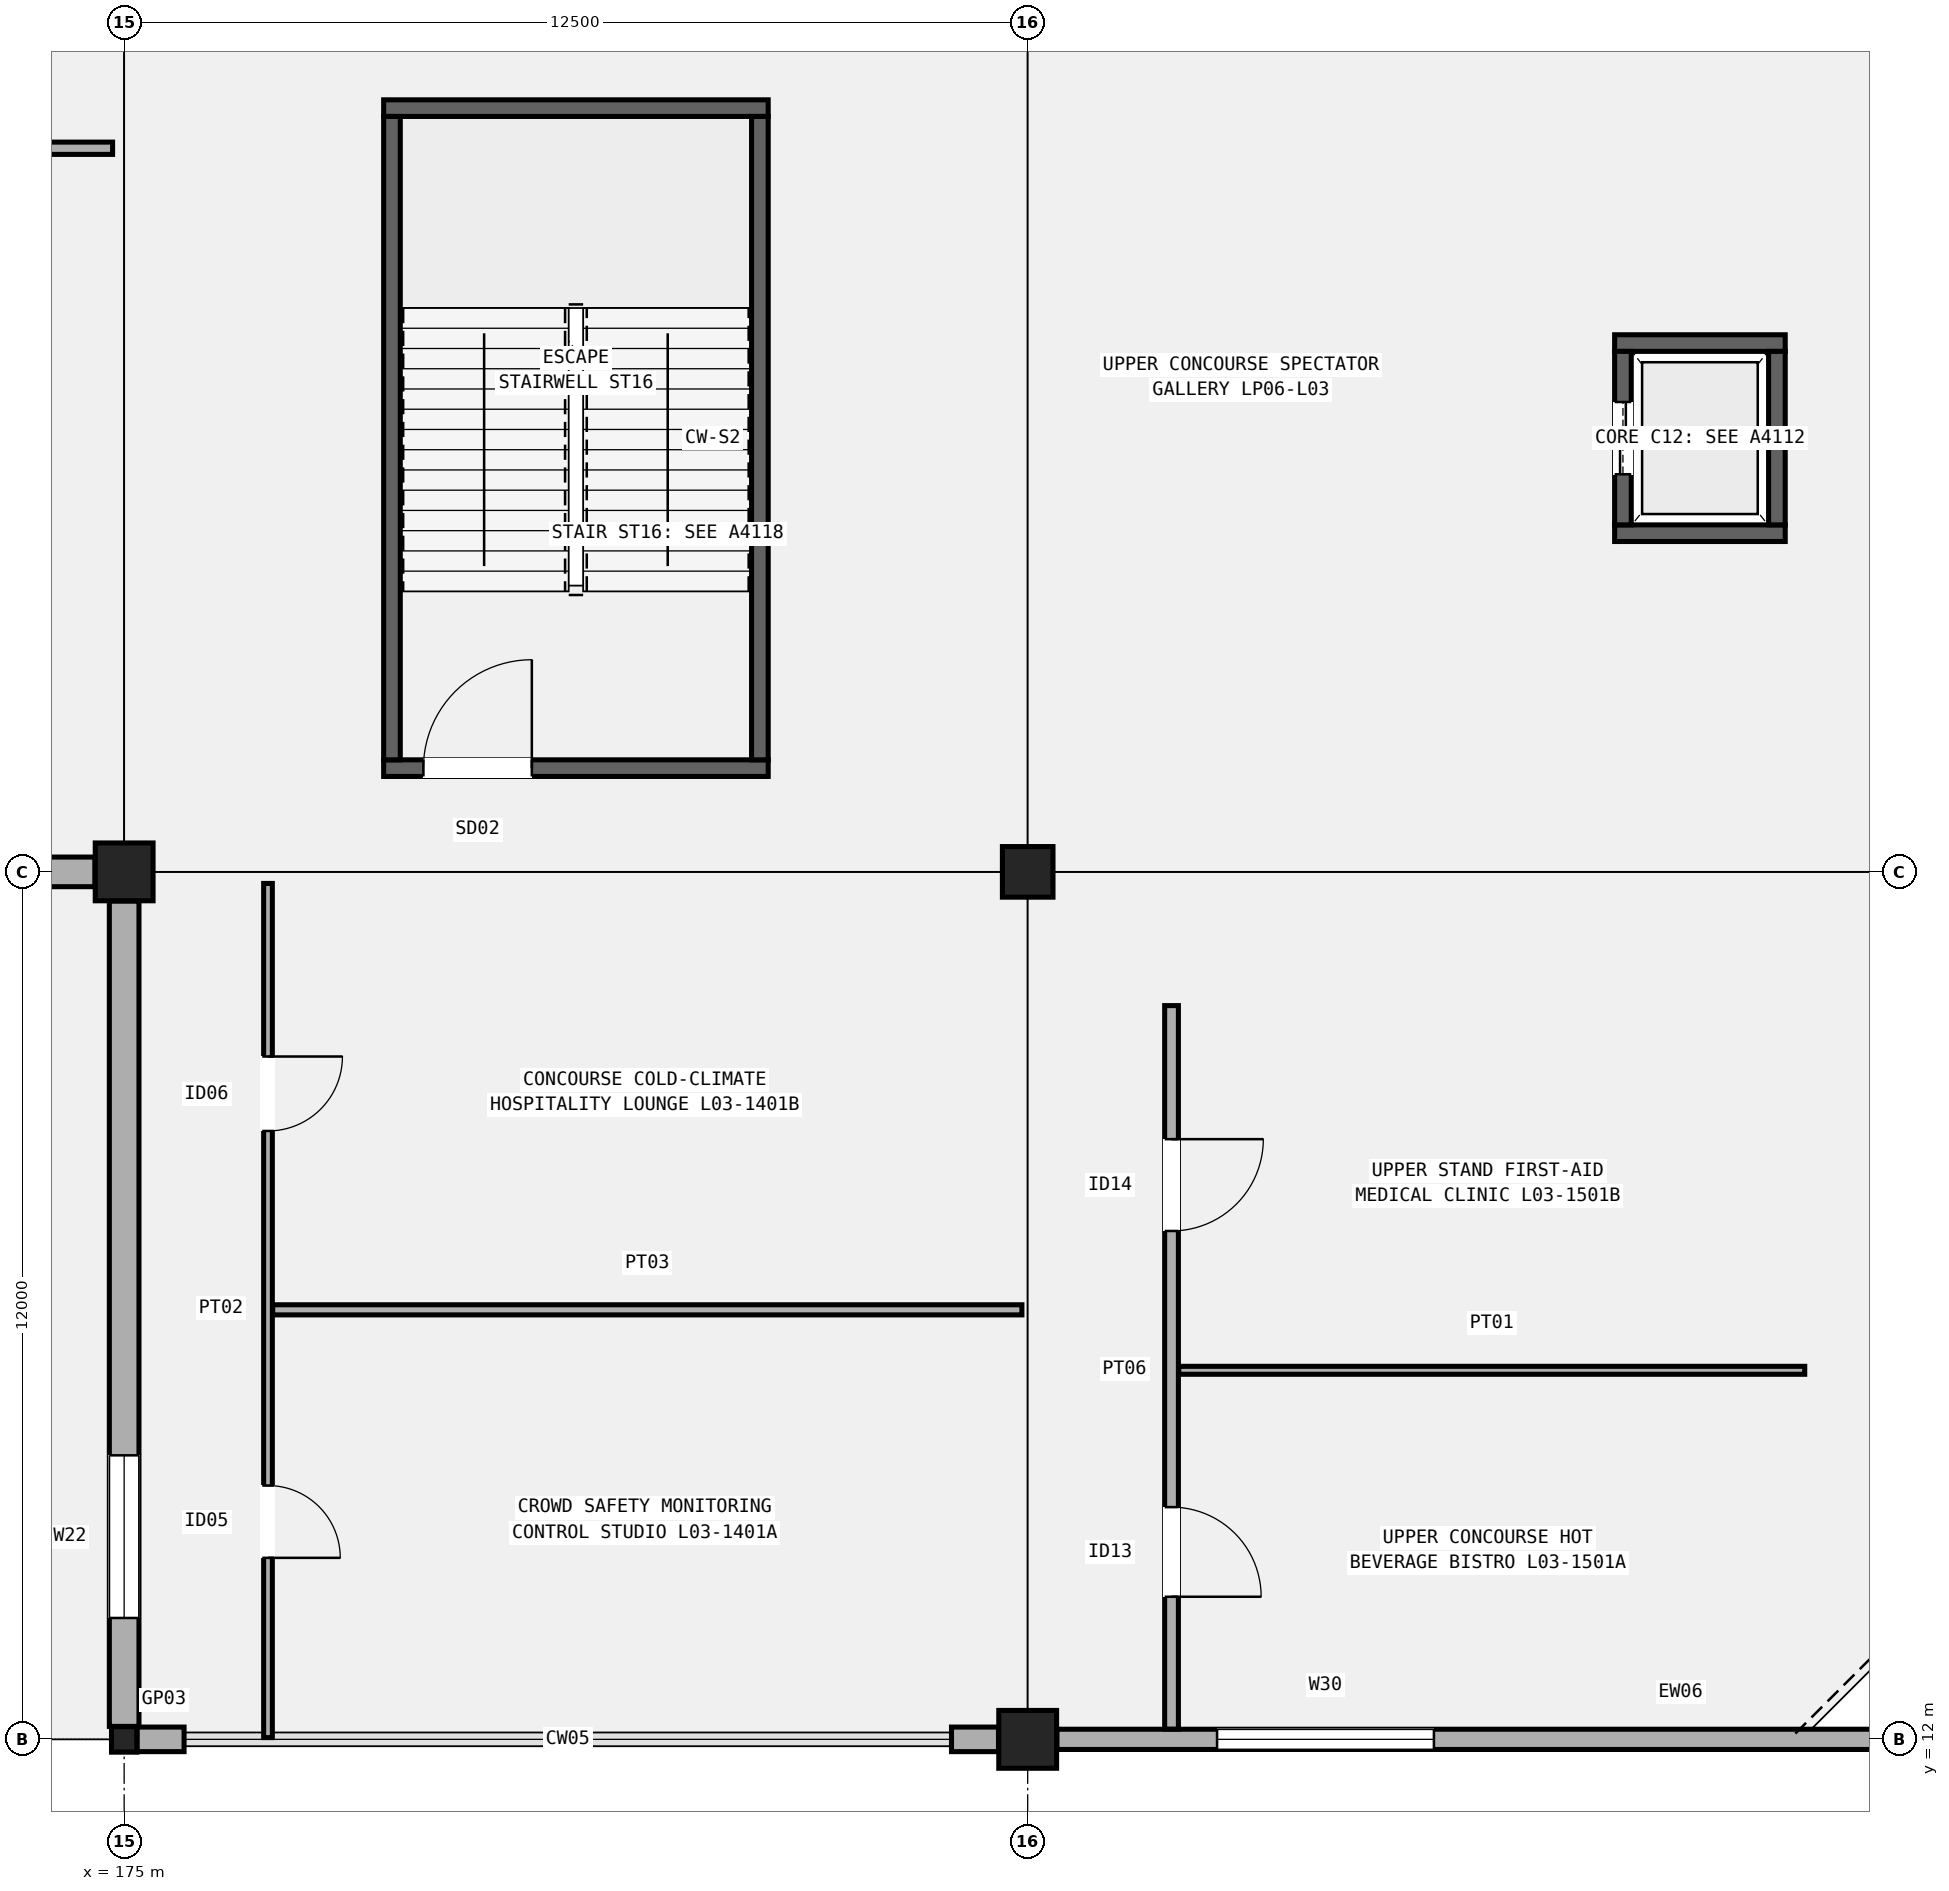
"""IFC4 building model, lengths in metres.
Left out: names, types, materials, properties, quantities, classifications, styles, units other than length and angle.
Written with IfcOpenShell. Run it as: python <this file> out.ifc"""

import sys

from ifc_helpers import new_model, si_unit, direction, frame, frame_2d, origin, origin_2d, place, context, subcontext, project, spatial, rectangle, hollow_rectangle, extrude, element, fill, save


model = new_model("IFC4")
c1 = context("Model", 3, precision=1e-05, world=origin(), true_north=direction((0.0, 1.0)))
c2 = subcontext(c1, "Body", "Model", "MODEL_VIEW")
j1 = project(units=[si_unit("LENGTHUNIT", "METRE"), si_unit("PLANEANGLEUNIT", "RADIAN")], contexts=[c1])
p1 = place(None, origin())
s1 = spatial("IfcSite", under=j1, at=p1, CompositionType="ELEMENT")
p2 = place(p1, origin())
s2 = spatial("IfcBuilding", under=s1, at=p2, CompositionType="ELEMENT")
p3 = place(p2, frame((0.0, 0.0, 15.3)))
s3 = spatial("IfcBuildingStorey", under=s2, at=p3, CompositionType="ELEMENT", Elevation=15.3)
p4 = place(p3, frame((175.0, 12.0, 0.0), z_axis=(0.0, 0.0, 1.0), x_axis=(1.0, 0.0, 0.0)))
e1 = element("IfcColumn", 1, at=p4, inside=s3, PredefinedType="COLUMN", context=c2, shape_type="SweptSolid", body=[
    extrude(hollow_rectangle(XDim=0.35, YDim=0.35, WallThickness=0.016, InnerFilletRadius=0.016, OuterFilletRadius=0.032, at=origin_2d()), origin(), (0.0, 0.0, 1.0), 5.1),
])
for number, where, z_axis, x_axis in (
    (2, (175.0, 24.0, 0.0), (0.0, 0.0, 1.0), (1.0, 0.0, 0.0)),
    (3, (187.5, 12.0, 0.0), (0.0, 0.0, 1.0), (1.0, 0.0, 0.0)),
):
    element("IfcColumn", number, at=place(p3, frame(where, z_axis=z_axis, x_axis=x_axis)), inside=s3, PredefinedType="COLUMN", context=c2, shape_type="SweptSolid", body=[
        extrude(rectangle(XDim=0.8, YDim=0.8, at=origin_2d()), origin(), (0.0, 0.0, 1.0), 5.1),
    ])
p5 = place(p3, frame((187.5, 24.0, 0.0), z_axis=(0.0, 0.0, 1.0), x_axis=(1.0, 0.0, 0.0)))
e4 = element("IfcColumn", 4, at=p5, inside=s3, PredefinedType="COLUMN", context=c2, shape_type="SweptSolid", body=[
    extrude(rectangle(XDim=0.7, YDim=0.7, at=origin_2d()), origin(), (0.0, 0.0, 1.0), 5.1),
])
p6 = place(p3, frame((162.679, 24.0, 0.0), z_axis=(0.0, 0.0, 1.0), x_axis=(1.0, 0.0, 0.0)))
e5 = element("IfcWall", 5, at=p6, inside=s3, PredefinedType="SOLIDWALL", context=c2, shape_type="SweptSolid", body=[
    extrude(rectangle(XDim=11.917, YDim=0.41, at=frame_2d((5.958, 0.0))), origin(), (0.0, 0.0, 1.0), 4.06),
])
p7 = place(p6, frame((1.5, 0.0, 0.95)))
e6 = element("IfcOpeningElement", 6, at=p7, cuts=e5, PredefinedType="OPENING", context=c2, shape_type="SweptSolid", body=[
    extrude(rectangle(XDim=2.1, YDim=2.25, at=frame_2d((1.05, 1.125))), frame((0.0, 0.215, 0.0), z_axis=(0.0, -1.0, 0.0), x_axis=(1.0, 0.0, 0.0)), (0.0, 0.0, 1.0), 0.43),
])
p8 = place(p3, frame((175.179, 12.0, 0.0), z_axis=(0.0, 0.0, 1.0), x_axis=(1.0, 0.0, 0.0)))
e7 = element("IfcWall", 7, at=p8, inside=s3, PredefinedType="SOLIDWALL", context=c2, shape_type="SweptSolid", body=[
    extrude(rectangle(XDim=0.65, YDim=0.34, at=frame_2d((0.325, 0.0))), origin(), (0.0, 0.0, 1.0), 4.06),
])
p9 = place(p3, frame((186.446, 12.0, 0.0), z_axis=(0.0, 0.0, 1.0), x_axis=(1.0, 0.0, 0.0)))
e8 = element("IfcWall", 8, at=p9, inside=s3, PredefinedType="SOLIDWALL", context=c2, shape_type="SweptSolid", body=[
    extrude(rectangle(XDim=0.65, YDim=0.34, at=frame_2d((0.325, 0.0))), origin(), (0.0, 0.0, 1.0), 4.06),
])
p10 = place(p3, frame((175.0, 12.179, 0.0), z_axis=(0.0, 0.0, 1.0), x_axis=(0.0, 1.0, 0.0)))
e9 = element("IfcWall", 9, at=p10, inside=s3, PredefinedType="SOLIDWALL", context=c2, shape_type="SweptSolid", body=[
    extrude(rectangle(XDim=11.417, YDim=0.41, at=frame_2d((5.708, 0.0))), origin(), (0.0, 0.0, 1.0), 4.06),
])
p11 = place(p10, frame((1.5, 0.0, 0.95)))
e10 = element("IfcOpeningElement", 10, at=p11, cuts=e9, PredefinedType="OPENING", context=c2, shape_type="SweptSolid", body=[
    extrude(rectangle(XDim=2.25, YDim=2.2, at=frame_2d((1.125, 1.1))), frame((0.0, 0.215, 0.0), z_axis=(0.0, -1.0, 0.0), x_axis=(1.0, 0.0, 0.0)), (0.0, 0.0, 1.0), 0.43),
])
p12 = place(p3, frame((187.904, 12.0, 0.0), z_axis=(0.0, 0.0, 1.0), x_axis=(1.0, 0.0, 0.0)))
e11 = element("IfcWall", 11, at=p12, inside=s3, PredefinedType="SOLIDWALL", context=c2, shape_type="SweptSolid", body=[
    extrude(rectangle(XDim=11.742, YDim=0.28, at=frame_2d((5.871, 0.0))), origin(), (0.0, 0.0, 1.0), 4.16),
])
p13 = place(p12, frame((2.216, 0.0, 0.95)))
e12 = element("IfcOpeningElement", 12, at=p13, cuts=e11, PredefinedType="OPENING", context=c2, shape_type="SweptSolid", body=[
    extrude(rectangle(XDim=3.0, YDim=1.7, at=frame_2d((1.5, 0.85))), frame((0.0, 0.15, 0.0), z_axis=(0.0, -1.0, 0.0), x_axis=(1.0, 0.0, 0.0)), (0.0, 0.0, 1.0), 0.3),
])
p14 = place(p3, frame((178.59, 25.435, 0.0), z_axis=(0.0, 0.0, 1.0), x_axis=(1.0, 0.0, 0.0)))
e13 = element("IfcWall", 13, at=p14, inside=s3, PredefinedType="SHEAR", context=c2, shape_type="SweptSolid", body=[
    extrude(rectangle(XDim=5.32, YDim=0.23, at=frame_2d((2.66, 0.0))), origin(), (0.0, 0.0, 1.0), 4.86),
])
p15 = place(p14, frame((0.55, 0.0, 0.0)))
e14 = element("IfcOpeningElement", 14, at=p15, cuts=e13, PredefinedType="OPENING", context=c2, shape_type="SweptSolid", body=[
    extrude(rectangle(XDim=1.5, YDim=2.2, at=frame_2d((0.75, 1.1))), frame((0.0, 0.125, 0.0), z_axis=(0.0, -1.0, 0.0), x_axis=(1.0, 0.0, 0.0)), (0.0, 0.0, 1.0), 0.25),
])
p16 = place(p3, frame((178.59, 34.565, 0.0), z_axis=(0.0, 0.0, 1.0), x_axis=(1.0, 0.0, 0.0)))
e15 = element("IfcWall", 15, at=p16, inside=s3, PredefinedType="SHEAR", context=c2, shape_type="SweptSolid", body=[
    extrude(rectangle(XDim=5.32, YDim=0.23, at=frame_2d((2.66, 0.0))), origin(), (0.0, 0.0, 1.0), 4.86),
])
for number, where, z_axis, x_axis in (
    (16, (178.705, 25.55, 0.0), (0.0, 0.0, 1.0), (0.0, 1.0, 0.0)),
    (17, (183.795, 25.55, 0.0), (0.0, 0.0, 1.0), (0.0, 1.0, 0.0)),
):
    element("IfcWall", number, at=place(p3, frame(where, z_axis=z_axis, x_axis=x_axis)), inside=s3, PredefinedType="SHEAR", context=c2, shape_type="SweptSolid", body=[
        extrude(rectangle(XDim=8.9, YDim=0.23, at=frame_2d((4.45, 0.0))), origin(), (0.0, 0.0, 1.0), 4.86),
    ])
for number, where, z_axis, x_axis in (
    (18, (195.62, 28.685, 0.0), (0.0, 0.0, 1.0), (1.0, 0.0, 0.0)),
    (19, (195.62, 31.315, 0.0), (0.0, 0.0, 1.0), (1.0, 0.0, 0.0)),
):
    element("IfcWall", number, at=place(p3, frame(where, z_axis=z_axis, x_axis=x_axis)), inside=s3, PredefinedType="SHEAR", context=c2, shape_type="SweptSolid", body=[
        extrude(rectangle(XDim=2.36, YDim=0.23, at=frame_2d((1.18, 0.0))), origin(), (0.0, 0.0, 1.0), 4.86),
    ])
p17 = place(p3, frame((195.735, 28.8, 0.0), z_axis=(0.0, 0.0, 1.0), x_axis=(0.0, 1.0, 0.0)))
e20 = element("IfcWall", 20, at=p17, inside=s3, PredefinedType="SHEAR", context=c2, shape_type="SweptSolid", body=[
    extrude(rectangle(XDim=2.4, YDim=0.23, at=frame_2d((1.2, 0.0))), origin(), (0.0, 0.0, 1.0), 4.86),
])
p18 = place(p17, frame((0.7, 0.0, 0.0)))
e21 = element("IfcOpeningElement", 21, at=p18, cuts=e20, PredefinedType="OPENING", context=c2, shape_type="SweptSolid", body=[
    extrude(rectangle(XDim=1.0, YDim=2.15, at=frame_2d((0.5, 1.075))), frame((0.0, 0.125, 0.0), z_axis=(0.0, -1.0, 0.0), x_axis=(1.0, 0.0, 0.0)), (0.0, 0.0, 1.0), 0.25),
])
p19 = place(p3, frame((197.865, 28.8, 0.0), z_axis=(0.0, 0.0, 1.0), x_axis=(0.0, 1.0, 0.0)))
e22 = element("IfcWall", 22, at=p19, inside=s3, PredefinedType="SHEAR", context=c2, shape_type="SweptSolid", body=[
    extrude(rectangle(XDim=2.4, YDim=0.23, at=frame_2d((1.2, 0.0))), origin(), (0.0, 0.0, 1.0), 4.86),
])
p20 = place(p3, frame((162.66, 34.01, 0.0), z_axis=(0.0, 0.0, 1.0), x_axis=(1.0, 0.0, 0.0)))
e23 = element("IfcWall", 23, at=p20, inside=s3, PredefinedType="PARTITIONING", context=c2, shape_type="SweptSolid", body=[
    extrude(rectangle(XDim=12.18, YDim=0.17, at=frame_2d((6.09, 0.0))), origin(), (0.0, 0.0, 1.0), 2.77),
])
p21 = place(p20, frame((6.97, 0.0, 0.0), z_axis=(0.0, 0.0, 1.0), x_axis=(-1.0, 0.0, 0.0)))
e24 = element("IfcOpeningElement", 24, at=p21, cuts=e23, PredefinedType="OPENING", context=c2, shape_type="SweptSolid", body=[
    extrude(rectangle(XDim=1.76, YDim=2.3, at=frame_2d((0.88, 1.15))), frame((0.0, 0.095, 0.0), z_axis=(0.0, -1.0, 0.0), x_axis=(1.0, 0.0, 0.0)), (0.0, 0.0, 1.0), 0.19),
])
p22 = place(p3, frame((176.99, 12.024, 0.0), z_axis=(0.0, 0.0, 1.0), x_axis=(0.0, 1.0, 0.0)))
e25 = element("IfcWall", 25, at=p22, inside=s3, PredefinedType="PARTITIONING", context=c2, shape_type="SweptSolid", body=[
    extrude(rectangle(XDim=11.816, YDim=0.12, at=frame_2d((5.908, 0.0))), origin(), (0.0, 0.0, 1.0), 2.77),
])
p23 = place(p22, frame((3.487, 0.0, 0.0), z_axis=(0.0, 0.0, 1.0), x_axis=(-1.0, 0.0, 0.0)))
e26 = element("IfcOpeningElement", 26, at=p23, cuts=e25, PredefinedType="OPENING", context=c2, shape_type="SweptSolid", body=[
    extrude(rectangle(XDim=1.0, YDim=2.14, at=frame_2d((0.5, 1.07))), frame((0.0, 0.07, 0.0), z_axis=(0.0, -1.0, 0.0), x_axis=(1.0, 0.0, 0.0)), (0.0, 0.0, 1.0), 0.14),
])
p24 = place(p22, frame((9.422, 0.0, 0.0), z_axis=(0.0, 0.0, 1.0), x_axis=(-1.0, 0.0, 0.0)))
e27 = element("IfcOpeningElement", 27, at=p24, cuts=e25, PredefinedType="OPENING", context=c2, shape_type="SweptSolid", body=[
    extrude(rectangle(XDim=1.03, YDim=2.12, at=frame_2d((0.515, 1.06))), frame((0.0, 0.07, 0.0), z_axis=(0.0, -1.0, 0.0), x_axis=(1.0, 0.0, 0.0)), (0.0, 0.0, 1.0), 0.14),
])
p25 = place(p3, frame((177.055, 17.942, 0.0), z_axis=(0.0, 0.0, 1.0), x_axis=(1.0, 0.0, 0.0)))
e28 = element("IfcWall", 28, at=p25, inside=s3, PredefinedType="PARTITIONING", context=c2, shape_type="SweptSolid", body=[
    extrude(rectangle(XDim=10.365, YDim=0.14, at=frame_2d((5.183, 0.0))), origin(), (0.0, 0.0, 1.0), 2.77),
])
p26 = place(p3, frame((189.49, 12.142, 0.0), z_axis=(0.0, 0.0, 1.0), x_axis=(0.0, 1.0, 0.0)))
e29 = element("IfcWall", 29, at=p26, inside=s3, PredefinedType="PARTITIONING", context=c2, shape_type="SweptSolid", body=[
    extrude(rectangle(XDim=10.008, YDim=0.19, at=frame_2d((5.004, 0.0))), origin(), (0.0, 0.0, 1.0), 4.22),
])
p27 = place(p26, frame((3.071, 0.0, 0.0), z_axis=(0.0, 0.0, 1.0), x_axis=(-1.0, 0.0, 0.0)))
e30 = element("IfcOpeningElement", 30, at=p27, cuts=e29, PredefinedType="OPENING", context=c2, shape_type="SweptSolid", body=[
    extrude(rectangle(XDim=1.24, YDim=2.22, at=frame_2d((0.62, 1.11))), frame((0.0, 0.105, 0.0), z_axis=(0.0, -1.0, 0.0), x_axis=(1.0, 0.0, 0.0)), (0.0, 0.0, 1.0), 0.21),
])
p28 = place(p26, frame((8.16, 0.0, 0.0), z_axis=(0.0, 0.0, 1.0), x_axis=(-1.0, 0.0, 0.0)))
e31 = element("IfcOpeningElement", 31, at=p28, cuts=e29, PredefinedType="OPENING", context=c2, shape_type="SweptSolid", body=[
    extrude(rectangle(XDim=1.27, YDim=2.2, at=frame_2d((0.635, 1.1))), frame((0.0, 0.105, 0.0), z_axis=(0.0, -1.0, 0.0), x_axis=(1.0, 0.0, 0.0)), (0.0, 0.0, 1.0), 0.21),
])
p29 = place(p3, frame((189.59, 17.105, 0.0), z_axis=(0.0, 0.0, 1.0), x_axis=(1.0, 0.0, 0.0)))
e32 = element("IfcWall", 32, at=p29, inside=s3, PredefinedType="PARTITIONING", context=c2, shape_type="SweptSolid", body=[
    extrude(rectangle(XDim=8.66, YDim=0.11, at=frame_2d((4.33, 0.0))), origin(), (0.0, 0.0, 1.0), 4.22),
])
p30 = place(p11, origin())
e33 = element("IfcWindow", 33, at=p30, inside=s3, PartitioningType="SINGLE_PANEL", PredefinedType="WINDOW", context=c2, shape_type="SweptSolid", body=[
    extrude(rectangle(XDim=2.25, YDim=2.2, at=frame_2d((1.125, 1.1))), frame((0.0, 0.03, 0.0), z_axis=(0.0, -1.0, 0.0), x_axis=(1.0, 0.0, 0.0)), (0.0, 0.0, 1.0), 0.06),
])
fill(e10, e33)
p31 = place(p13, origin())
e34 = element("IfcWindow", 34, at=p31, inside=s3, PartitioningType="SINGLE_PANEL", PredefinedType="WINDOW", context=c2, shape_type="SweptSolid", body=[
    extrude(rectangle(XDim=3.0, YDim=1.7, at=frame_2d((1.5, 0.85))), frame((0.0, 0.03, 0.0), z_axis=(0.0, -1.0, 0.0), x_axis=(1.0, 0.0, 0.0)), (0.0, 0.0, 1.0), 0.06),
])
fill(e12, e34)
p32 = place(p15, origin())
e35 = element("IfcDoor", 35, at=p32, inside=s3, OperationType="SINGLE_SWING_RIGHT", PredefinedType="DOOR", context=c2, shape_type="SweptSolid", body=[
    extrude(rectangle(XDim=1.5, YDim=2.2, at=frame_2d((0.75, 1.1))), frame((0.0, 0.025, 0.0), z_axis=(0.0, -1.0, 0.0), x_axis=(1.0, 0.0, 0.0)), (0.0, 0.0, 1.0), 0.05),
])
fill(e14, e35)
p33 = place(p18, origin())
e36 = element("IfcDoor", 36, at=p33, inside=s3, OperationType="DOUBLE_DOOR_SLIDING", PredefinedType="DOOR", context=c2, shape_type="SweptSolid", body=[
    extrude(rectangle(XDim=1.0, YDim=2.15, at=frame_2d((0.5, 1.075))), frame((0.0, 0.025, 0.0), z_axis=(0.0, -1.0, 0.0), x_axis=(1.0, 0.0, 0.0)), (0.0, 0.0, 1.0), 0.05),
])
fill(e21, e36)
p34 = place(p23, origin())
e37 = element("IfcDoor", 37, at=p34, inside=s3, OperationType="SINGLE_SWING_RIGHT", PredefinedType="DOOR", context=c2, shape_type="SweptSolid", body=[
    extrude(rectangle(XDim=1.0, YDim=2.14, at=frame_2d((0.5, 1.07))), frame((0.0, 0.025, 0.0), z_axis=(0.0, -1.0, 0.0), x_axis=(1.0, 0.0, 0.0)), (0.0, 0.0, 1.0), 0.05),
])
fill(e26, e37)
p35 = place(p24, origin())
e38 = element("IfcDoor", 38, at=p35, inside=s3, OperationType="SINGLE_SWING_LEFT", PredefinedType="DOOR", context=c2, shape_type="SweptSolid", body=[
    extrude(rectangle(XDim=1.03, YDim=2.12, at=frame_2d((0.515, 1.06))), frame((0.0, 0.025, 0.0), z_axis=(0.0, -1.0, 0.0), x_axis=(1.0, 0.0, 0.0)), (0.0, 0.0, 1.0), 0.05),
])
fill(e27, e38)
p36 = place(p27, origin())
e39 = element("IfcDoor", 39, at=p36, inside=s3, OperationType="SINGLE_SWING_RIGHT", PredefinedType="DOOR", context=c2, shape_type="SweptSolid", body=[
    extrude(rectangle(XDim=1.24, YDim=2.22, at=frame_2d((0.62, 1.11))), frame((0.0, 0.025, 0.0), z_axis=(0.0, -1.0, 0.0), x_axis=(1.0, 0.0, 0.0)), (0.0, 0.0, 1.0), 0.05),
])
fill(e30, e39)
p37 = place(p28, origin())
e40 = element("IfcDoor", 40, at=p37, inside=s3, OperationType="SINGLE_SWING_LEFT", PredefinedType="DOOR", context=c2, shape_type="SweptSolid", body=[
    extrude(rectangle(XDim=1.27, YDim=2.2, at=frame_2d((0.635, 1.1))), frame((0.0, 0.025, 0.0), z_axis=(0.0, -1.0, 0.0), x_axis=(1.0, 0.0, 0.0)), (0.0, 0.0, 1.0), 0.05),
])
fill(e31, e40)
save(model, sys.argv[1])
